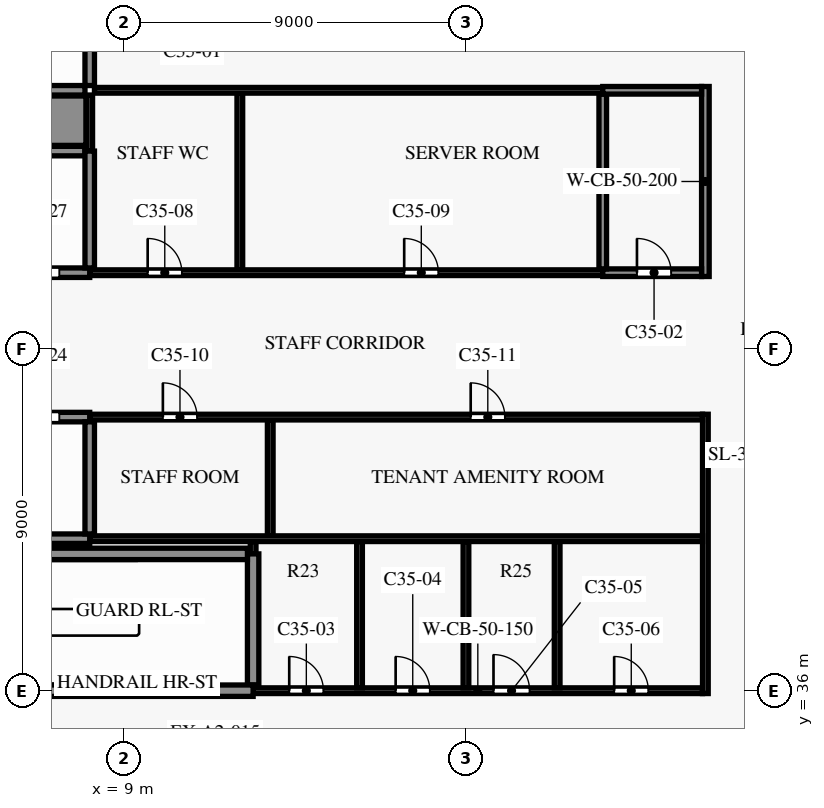
"""IFC4 building model, lengths in metres.
Left out: names, types, materials, properties, quantities, classifications, styles, units other than length and angle.
Written with IfcOpenShell. Run it as: python <this file> out.ifc"""

import sys

from ifc_helpers import new_model, si_unit, direction, frame, frame_2d, origin, place, context, subcontext, project, spatial, rectangle, extrude, element, fill, save


model = new_model("IFC4")
c1 = context("Model", 3, precision=1e-05, world=origin(), true_north=direction((0.0, 1.0)))
c2 = subcontext(c1, "Body", "Model", "MODEL_VIEW")
j1 = project(units=[si_unit("LENGTHUNIT", "METRE"), si_unit("PLANEANGLEUNIT", "RADIAN")], contexts=[c1])
p1 = place(None, origin())
s1 = spatial("IfcSite", under=j1, at=p1, CompositionType="ELEMENT")
p2 = place(p1, origin())
s2 = spatial("IfcBuilding", under=s1, at=p2, CompositionType="ELEMENT")
p3 = place(p2, frame((0.0, 0.0, 256.2)))
s3 = spatial("IfcBuildingStorey", under=s2, at=p3, CompositionType="ELEMENT", Elevation=256.2)
p4 = place(p3, frame((12.4, 36.0, 0.0), z_axis=(0.0, 0.0, 1.0), x_axis=(1.0, 0.0, 0.0)))
e1 = element("IfcWall", 1, at=p4, inside=s3, PredefinedType="SHEAR", context=c2, shape_type="SweptSolid", body=[
    extrude(rectangle(XDim=11.825, YDim=0.15, at=frame_2d((5.913, 0.0))), origin(), (0.0, 0.0, 1.0), 3.5),
])
p5 = place(p4, frame((0.95, 0.0, 0.0)))
e2 = element("IfcOpeningElement", 2, at=p5, cuts=e1, PredefinedType="OPENING", context=c2, shape_type="SweptSolid", body=[
    extrude(rectangle(XDim=0.9, YDim=2.1, at=frame_2d((0.45, 1.05))), frame((0.0, 0.085, 0.0), z_axis=(0.0, -1.0, 0.0), x_axis=(1.0, 0.0, 0.0)), (0.0, 0.0, 1.0), 0.17),
])
p6 = place(p4, frame((3.75, 0.0, 0.0)))
e3 = element("IfcOpeningElement", 3, at=p6, cuts=e1, PredefinedType="OPENING", context=c2, shape_type="SweptSolid", body=[
    extrude(rectangle(XDim=0.9, YDim=2.1, at=frame_2d((0.45, 1.05))), frame((0.0, 0.085, 0.0), z_axis=(0.0, -1.0, 0.0), x_axis=(1.0, 0.0, 0.0)), (0.0, 0.0, 1.0), 0.17),
])
p7 = place(p4, frame((6.325, 0.0, 0.0)))
e4 = element("IfcOpeningElement", 4, at=p7, cuts=e1, PredefinedType="OPENING", context=c2, shape_type="SweptSolid", body=[
    extrude(rectangle(XDim=0.95, YDim=2.1, at=frame_2d((0.475, 1.05))), frame((0.0, 0.085, 0.0), z_axis=(0.0, -1.0, 0.0), x_axis=(1.0, 0.0, 0.0)), (0.0, 0.0, 1.0), 0.17),
])
p8 = place(p4, frame((9.5, 0.0, 0.0)))
e5 = element("IfcOpeningElement", 5, at=p8, cuts=e1, PredefinedType="OPENING", context=c2, shape_type="SweptSolid", body=[
    extrude(rectangle(XDim=0.9, YDim=2.1, at=frame_2d((0.45, 1.05))), frame((0.0, 0.085, 0.0), z_axis=(0.0, -1.0, 0.0), x_axis=(1.0, 0.0, 0.0)), (0.0, 0.0, 1.0), 0.17),
])
p9 = place(p3, frame((4.4, 36.0, 0.0), z_axis=(0.0, 0.0, 1.0), x_axis=(1.0, 0.0, 0.0)))
e6 = element("IfcWall", 6, at=p9, inside=s3, PredefinedType="SHEAR", context=c2, shape_type="SweptSolid", body=[
    extrude(rectangle(XDim=8.0, YDim=0.3, at=frame_2d((4.0, 0.0))), origin(), (0.0, 0.0, 1.0), 3.5),
])
p10 = place(p9, frame((0.3, 0.0, 0.0)))
e7 = element("IfcOpeningElement", 7, at=p10, cuts=e6, PredefinedType="OPENING", context=c2, shape_type="SweptSolid", body=[
    extrude(rectangle(XDim=1.5, YDim=2.2, at=frame_2d((0.75, 1.1))), frame((0.0, 0.16, 0.0), z_axis=(0.0, -1.0, 0.0), x_axis=(1.0, 0.0, 0.0)), (0.0, 0.0, 1.0), 0.32),
])
p11 = place(p3, frame((4.55, 39.6, 0.0), z_axis=(0.0, 0.0, 1.0), x_axis=(1.0, 0.0, 0.0)))
e8 = element("IfcWall", 8, at=p11, inside=s3, PredefinedType="SHEAR", context=c2, shape_type="SweptSolid", body=[
    extrude(rectangle(XDim=7.7, YDim=0.3, at=frame_2d((3.85, 0.0))), origin(), (0.0, 0.0, 1.0), 3.5),
])
p12 = place(p3, frame((8.1, 40.0, 0.0), z_axis=(0.0, 0.0, 1.0), x_axis=(1.0, 0.0, 0.0)))
e9 = element("IfcWall", 9, at=p12, inside=s3, PredefinedType="PARTITIONING", context=c2, shape_type="SweptSolid", body=[
    extrude(rectangle(XDim=16.125, YDim=0.15, at=frame_2d((8.062, 0.0))), origin(), (0.0, 0.0, 1.0), 3.5),
])
p13 = place(p3, frame((0.15, 40.0, 0.0), z_axis=(0.0, 0.0, 1.0), x_axis=(1.0, 0.0, 0.0)))
e10 = element("IfcWall", 10, at=p13, inside=s3, PredefinedType="SHEAR", context=c2, shape_type="SweptSolid", body=[
    extrude(rectangle(XDim=7.95, YDim=0.25, at=frame_2d((3.975, 0.0))), origin(), (0.0, 0.0, 1.0), 3.5),
])
p14 = place(p3, frame((8.1, 43.2, 0.0), z_axis=(0.0, 0.0, 1.0), x_axis=(1.0, 0.0, 0.0)))
e11 = element("IfcWall", 11, at=p14, inside=s3, PredefinedType="PARTITIONING", context=c2, shape_type="SweptSolid", body=[
    extrude(rectangle(XDim=16.125, YDim=0.15, at=frame_2d((8.062, 0.0))), origin(), (0.0, 0.0, 1.0), 3.5),
])
p15 = place(p14, frame((1.925, 0.0, 0.0)))
e12 = element("IfcOpeningElement", 12, at=p15, cuts=e11, PredefinedType="OPENING", context=c2, shape_type="SweptSolid", body=[
    extrude(rectangle(XDim=0.9, YDim=2.1, at=frame_2d((0.45, 1.05))), frame((0.0, 0.085, 0.0), z_axis=(0.0, -1.0, 0.0), x_axis=(1.0, 0.0, 0.0)), (0.0, 0.0, 1.0), 0.17),
])
p16 = place(p14, frame((10.025, 0.0, 0.0)))
e13 = element("IfcOpeningElement", 13, at=p16, cuts=e11, PredefinedType="OPENING", context=c2, shape_type="SweptSolid", body=[
    extrude(rectangle(XDim=0.9, YDim=2.1, at=frame_2d((0.45, 1.05))), frame((0.0, 0.085, 0.0), z_axis=(0.0, -1.0, 0.0), x_axis=(1.0, 0.0, 0.0)), (0.0, 0.0, 1.0), 0.17),
])
p17 = place(p3, frame((0.125, 43.2, 0.0), z_axis=(0.0, 0.0, 1.0), x_axis=(1.0, 0.0, 0.0)))
e14 = element("IfcWall", 14, at=p17, inside=s3, PredefinedType="SHEAR", context=c2, shape_type="SweptSolid", body=[
    extrude(rectangle(XDim=7.975, YDim=0.25, at=frame_2d((3.988, 0.0))), origin(), (0.0, 0.0, 1.0), 3.5),
])
p18 = place(p17, frame((0.675, 0.0, 0.0)))
e15 = element("IfcOpeningElement", 15, at=p18, cuts=e14, PredefinedType="OPENING", context=c2, shape_type="SweptSolid", body=[
    extrude(rectangle(XDim=1.1, YDim=2.1, at=frame_2d((0.55, 1.05))), frame((0.0, 0.135, 0.0), z_axis=(0.0, -1.0, 0.0), x_axis=(1.0, 0.0, 0.0)), (0.0, 0.0, 1.0), 0.27),
])
p19 = place(p17, frame((3.375, 0.0, 0.0)))
e16 = element("IfcOpeningElement", 16, at=p19, cuts=e14, PredefinedType="OPENING", context=c2, shape_type="SweptSolid", body=[
    extrude(rectangle(XDim=1.1, YDim=2.1, at=frame_2d((0.55, 1.05))), frame((0.0, 0.135, 0.0), z_axis=(0.0, -1.0, 0.0), x_axis=(1.0, 0.0, 0.0)), (0.0, 0.0, 1.0), 0.27),
])
p20 = place(p17, frame((6.075, 0.0, 0.0)))
e17 = element("IfcOpeningElement", 17, at=p20, cuts=e14, PredefinedType="OPENING", context=c2, shape_type="SweptSolid", body=[
    extrude(rectangle(XDim=1.1, YDim=2.1, at=frame_2d((0.55, 1.05))), frame((0.0, 0.135, 0.0), z_axis=(0.0, -1.0, 0.0), x_axis=(1.0, 0.0, 0.0)), (0.0, 0.0, 1.0), 0.27),
])
p21 = place(p3, frame((8.1, 47.0, 0.0), z_axis=(0.0, 0.0, 1.0), x_axis=(1.0, 0.0, 0.0)))
e18 = element("IfcWall", 18, at=p21, inside=s3, PredefinedType="PARTITIONING", context=c2, shape_type="SweptSolid", body=[
    extrude(rectangle(XDim=13.5, YDim=0.15, at=frame_2d((6.75, 0.0))), origin(), (0.0, 0.0, 1.0), 3.5),
])
p22 = place(p21, frame((1.525, 0.0, 0.0)))
e19 = element("IfcOpeningElement", 19, at=p22, cuts=e18, PredefinedType="OPENING", context=c2, shape_type="SweptSolid", body=[
    extrude(rectangle(XDim=0.9, YDim=2.1, at=frame_2d((0.45, 1.05))), frame((0.0, 0.085, 0.0), z_axis=(0.0, -1.0, 0.0), x_axis=(1.0, 0.0, 0.0)), (0.0, 0.0, 1.0), 0.17),
])
p23 = place(p21, frame((8.275, 0.0, 0.0)))
e20 = element("IfcOpeningElement", 20, at=p23, cuts=e18, PredefinedType="OPENING", context=c2, shape_type="SweptSolid", body=[
    extrude(rectangle(XDim=0.9, YDim=2.1, at=frame_2d((0.45, 1.05))), frame((0.0, 0.085, 0.0), z_axis=(0.0, -1.0, 0.0), x_axis=(1.0, 0.0, 0.0)), (0.0, 0.0, 1.0), 0.17),
])
p24 = place(p3, frame((21.6, 47.0, 0.0), z_axis=(0.0, 0.0, 1.0), x_axis=(1.0, 0.0, 0.0)))
e21 = element("IfcWall", 21, at=p24, inside=s3, PredefinedType="PARTITIONING", context=c2, shape_type="SweptSolid", body=[
    extrude(rectangle(XDim=2.6, YDim=0.2, at=frame_2d((1.3, 0.0))), origin(), (0.0, 0.0, 1.0), 3.5),
])
p25 = place(p24, frame((0.9, 0.0, 0.0)))
e22 = element("IfcOpeningElement", 22, at=p25, cuts=e21, PredefinedType="OPENING", context=c2, shape_type="SweptSolid", body=[
    extrude(rectangle(XDim=0.9, YDim=2.1, at=frame_2d((0.45, 1.05))), frame((0.0, 0.11, 0.0), z_axis=(0.0, -1.0, 0.0), x_axis=(1.0, 0.0, 0.0)), (0.0, 0.0, 1.0), 0.22),
])
p26 = place(p3, frame((0.125, 47.0, 0.0), z_axis=(0.0, 0.0, 1.0), x_axis=(1.0, 0.0, 0.0)))
e23 = element("IfcWall", 23, at=p26, inside=s3, PredefinedType="SHEAR", context=c2, shape_type="SweptSolid", body=[
    extrude(rectangle(XDim=7.975, YDim=0.25, at=frame_2d((3.988, 0.0))), origin(), (0.0, 0.0, 1.0), 3.5),
])
p27 = place(p26, frame((0.675, 0.0, 0.0)))
e24 = element("IfcOpeningElement", 24, at=p27, cuts=e23, PredefinedType="OPENING", context=c2, shape_type="SweptSolid", body=[
    extrude(rectangle(XDim=1.1, YDim=2.1, at=frame_2d((0.55, 1.05))), frame((0.0, 0.135, 0.0), z_axis=(0.0, -1.0, 0.0), x_axis=(1.0, 0.0, 0.0)), (0.0, 0.0, 1.0), 0.27),
])
p28 = place(p26, frame((3.375, 0.0, 0.0)))
e25 = element("IfcOpeningElement", 25, at=p28, cuts=e23, PredefinedType="OPENING", context=c2, shape_type="SweptSolid", body=[
    extrude(rectangle(XDim=1.1, YDim=2.1, at=frame_2d((0.55, 1.05))), frame((0.0, 0.135, 0.0), z_axis=(0.0, -1.0, 0.0), x_axis=(1.0, 0.0, 0.0)), (0.0, 0.0, 1.0), 0.27),
])
p29 = place(p26, frame((6.075, 0.0, 0.0)))
e26 = element("IfcOpeningElement", 26, at=p29, cuts=e23, PredefinedType="OPENING", context=c2, shape_type="SweptSolid", body=[
    extrude(rectangle(XDim=1.1, YDim=2.1, at=frame_2d((0.55, 1.05))), frame((0.0, 0.135, 0.0), z_axis=(0.0, -1.0, 0.0), x_axis=(1.0, 0.0, 0.0)), (0.0, 0.0, 1.0), 0.27),
])
p30 = place(p3, frame((0.125, 50.2, 0.0), z_axis=(0.0, 0.0, 1.0), x_axis=(1.0, 0.0, 0.0)))
e27 = element("IfcWall", 27, at=p30, inside=s3, PredefinedType="SHEAR", context=c2, shape_type="SweptSolid", body=[
    extrude(rectangle(XDim=7.85, YDim=0.25, at=frame_2d((3.925, 0.0))), origin(), (0.0, 0.0, 1.0), 3.5),
])
p31 = place(p3, frame((-0.125, 51.0, 0.0), z_axis=(0.0, 0.0, 1.0), x_axis=(1.0, 0.0, 0.0)))
e28 = element("IfcWall", 28, at=p31, inside=s3, PredefinedType="SHEAR", context=c2, shape_type="SweptSolid", body=[
    extrude(rectangle(XDim=8.125, YDim=1.3, at=frame_2d((4.062, 0.0))), origin(), (0.0, 0.0, 1.0), 3.5),
])
p32 = place(p3, frame((8.225, 51.8, 0.0), z_axis=(0.0, 0.0, 1.0), x_axis=(1.0, 0.0, 0.0)))
e29 = element("IfcWall", 29, at=p32, inside=s3, PredefinedType="PARTITIONING", context=c2, shape_type="SweptSolid", body=[
    extrude(rectangle(XDim=13.375, YDim=0.15, at=frame_2d((6.688, 0.0))), origin(), (0.0, 0.0, 1.0), 3.5),
])
p33 = place(p3, frame((21.6, 51.8, 0.0), z_axis=(0.0, 0.0, 1.0), x_axis=(1.0, 0.0, 0.0)))
e30 = element("IfcWall", 30, at=p33, inside=s3, PredefinedType="PARTITIONING", context=c2, shape_type="SweptSolid", body=[
    extrude(rectangle(XDim=2.6, YDim=0.2, at=frame_2d((1.3, 0.0))), origin(), (0.0, 0.0, 1.0), 3.5),
])
p34 = place(p3, frame((0.125, 51.8, 0.0), z_axis=(0.0, 0.0, 1.0), x_axis=(1.0, 0.0, 0.0)))
e31 = element("IfcWall", 31, at=p34, inside=s3, PredefinedType="SHEAR", context=c2, shape_type="SweptSolid", body=[
    extrude(rectangle(XDim=7.85, YDim=0.25, at=frame_2d((3.925, 0.0))), origin(), (0.0, 0.0, 1.0), 3.5),
])
p35 = place(p3, frame((8.1, 50.2, 0.0), z_axis=(0.0, 0.0, 1.0), x_axis=(0.0, 1.0, 0.0)))
e32 = element("IfcWall", 32, at=p35, inside=s3, PredefinedType="PARTITIONING", context=c2, shape_type="SweptSolid", body=[
    extrude(rectangle(XDim=1.475, YDim=0.15, at=frame_2d((0.738, 0.0))), origin(), (0.0, 0.0, 1.0), 3.5),
])
p36 = place(p3, frame((8.1, 40.125, 0.0), z_axis=(0.0, 0.0, 1.0), x_axis=(0.0, 1.0, 0.0)))
e33 = element("IfcWall", 33, at=p36, inside=s3, PredefinedType="SHEAR", context=c2, shape_type="SweptSolid", body=[
    extrude(rectangle(XDim=2.95, YDim=0.25, at=frame_2d((1.475, 0.0))), origin(), (0.0, 0.0, 1.0), 3.5),
])
p37 = place(p3, frame((8.1, 47.125, 0.0), z_axis=(0.0, 0.0, 1.0), x_axis=(0.0, 1.0, 0.0)))
e34 = element("IfcWall", 34, at=p37, inside=s3, PredefinedType="SHEAR", context=c2, shape_type="SweptSolid", body=[
    extrude(rectangle(XDim=3.075, YDim=0.25, at=frame_2d((1.538, 0.0))), origin(), (0.0, 0.0, 1.0), 3.5),
])
p38 = place(p3, frame((8.1, 51.925, 0.0), z_axis=(0.0, 0.0, 1.0), x_axis=(0.0, 1.0, 0.0)))
e35 = element("IfcWall", 35, at=p38, inside=s3, PredefinedType="SHEAR", context=c2, shape_type="SweptSolid", body=[
    extrude(rectangle(XDim=2.95, YDim=0.25, at=frame_2d((1.475, 0.0))), origin(), (0.0, 0.0, 1.0), 3.5),
])
p39 = place(p3, frame((12.05, 47.075, 0.0), z_axis=(0.0, 0.0, 1.0), x_axis=(0.0, 1.0, 0.0)))
e36 = element("IfcWall", 36, at=p39, inside=s3, PredefinedType="PARTITIONING", context=c2, shape_type="SweptSolid", body=[
    extrude(rectangle(XDim=4.65, YDim=0.15, at=frame_2d((2.325, 0.0))), origin(), (0.0, 0.0, 1.0), 3.5),
])
p40 = place(p3, frame((12.4, 39.6, 0.0), z_axis=(0.0, 0.0, 1.0), x_axis=(0.0, 1.0, 0.0)))
e37 = element("IfcWall", 37, at=p40, inside=s3, PredefinedType="PARTITIONING", context=c2, shape_type="SweptSolid", body=[
    extrude(rectangle(XDim=0.325, YDim=0.15, at=frame_2d((0.163, 0.0))), origin(), (0.0, 0.0, 1.0), 3.5),
])
p41 = place(p3, frame((12.4, 36.15, 0.0), z_axis=(0.0, 0.0, 1.0), x_axis=(0.0, 1.0, 0.0)))
e38 = element("IfcWall", 38, at=p41, inside=s3, PredefinedType="SHEAR", context=c2, shape_type="SweptSolid", body=[
    extrude(rectangle(XDim=3.45, YDim=0.3, at=frame_2d((1.725, 0.0))), origin(), (0.0, 0.0, 1.0), 3.5),
])
p42 = place(p3, frame((12.85, 40.075, 0.0), z_axis=(0.0, 0.0, 1.0), x_axis=(0.0, 1.0, 0.0)))
e39 = element("IfcWall", 39, at=p42, inside=s3, PredefinedType="PARTITIONING", context=c2, shape_type="SweptSolid", body=[
    extrude(rectangle(XDim=3.05, YDim=0.15, at=frame_2d((1.525, 0.0))), origin(), (0.0, 0.0, 1.0), 3.5),
])
for number, where, z_axis, x_axis in (
    (40, (15.2, 36.075, 0.0), (0.0, 0.0, 1.0), (0.0, 1.0, 0.0)),
    (41, (18.0, 36.075, 0.0), (0.0, 0.0, 1.0), (0.0, 1.0, 0.0)),
    (42, (20.4, 36.075, 0.0), (0.0, 0.0, 1.0), (0.0, 1.0, 0.0)),
):
    element("IfcWall", number, at=place(p3, frame(where, z_axis=z_axis, x_axis=x_axis)), inside=s3, PredefinedType="PARTITIONING", context=c2, shape_type="SweptSolid", body=[
        extrude(rectangle(XDim=3.85, YDim=0.15, at=frame_2d((1.925, 0.0))), origin(), (0.0, 0.0, 1.0), 3.5),
    ])
p43 = place(p3, frame((21.6, 47.1, 0.0), z_axis=(0.0, 0.0, 1.0), x_axis=(0.0, 1.0, 0.0)))
e43 = element("IfcWall", 43, at=p43, inside=s3, PredefinedType="PARTITIONING", context=c2, shape_type="SweptSolid", body=[
    extrude(rectangle(XDim=4.6, YDim=0.2, at=frame_2d((2.3, 0.0))), origin(), (0.0, 0.0, 1.0), 3.5),
])
p44 = place(p3, frame((24.3, 35.925, 0.0), z_axis=(0.0, 0.0, 1.0), x_axis=(0.0, 1.0, 0.0)))
e44 = element("IfcWall", 44, at=p44, inside=s3, PredefinedType="PARTITIONING", context=c2, shape_type="SweptSolid", body=[
    extrude(rectangle(XDim=7.35, YDim=0.15, at=frame_2d((3.675, 0.0))), origin(), (0.0, 0.0, 1.0), 3.5),
])
p45 = place(p3, frame((24.3, 46.9, 0.0), z_axis=(0.0, 0.0, 1.0), x_axis=(0.0, 1.0, 0.0)))
e45 = element("IfcWall", 45, at=p45, inside=s3, PredefinedType="SHEAR", context=c2, shape_type="SweptSolid", body=[
    extrude(rectangle(XDim=5.0, YDim=0.2, at=frame_2d((2.5, 0.0))), origin(), (0.0, 0.0, 1.0), 3.5),
])
p46 = place(p25, origin())
e46 = element("IfcDoor", 46, at=p46, inside=s3, OperationType="SINGLE_SWING_LEFT", PredefinedType="DOOR", context=c2, shape_type="SweptSolid", body=[
    extrude(rectangle(XDim=0.9, YDim=2.1, at=frame_2d((0.45, 1.05))), frame((0.0, 0.025, 0.0), z_axis=(0.0, -1.0, 0.0), x_axis=(1.0, 0.0, 0.0)), (0.0, 0.0, 1.0), 0.05),
])
fill(e22, e46)
p47 = place(p5, origin())
e47 = element("IfcDoor", 47, at=p47, inside=s3, OperationType="SINGLE_SWING_RIGHT", PredefinedType="DOOR", context=c2, shape_type="SweptSolid", body=[
    extrude(rectangle(XDim=0.9, YDim=2.1, at=frame_2d((0.45, 1.05))), frame((0.0, 0.025, 0.0), z_axis=(0.0, -1.0, 0.0), x_axis=(1.0, 0.0, 0.0)), (0.0, 0.0, 1.0), 0.05),
])
fill(e2, e47)
p48 = place(p6, origin())
e48 = element("IfcDoor", 48, at=p48, inside=s3, OperationType="SINGLE_SWING_LEFT", PredefinedType="DOOR", context=c2, shape_type="SweptSolid", body=[
    extrude(rectangle(XDim=0.9, YDim=2.1, at=frame_2d((0.45, 1.05))), frame((0.0, 0.025, 0.0), z_axis=(0.0, -1.0, 0.0), x_axis=(1.0, 0.0, 0.0)), (0.0, 0.0, 1.0), 0.05),
])
fill(e3, e48)
p49 = place(p7, origin())
e49 = element("IfcDoor", 49, at=p49, inside=s3, OperationType="SINGLE_SWING_RIGHT", PredefinedType="DOOR", context=c2, shape_type="SweptSolid", body=[
    extrude(rectangle(XDim=0.95, YDim=2.1, at=frame_2d((0.475, 1.05))), frame((0.0, 0.025, 0.0), z_axis=(0.0, -1.0, 0.0), x_axis=(1.0, 0.0, 0.0)), (0.0, 0.0, 1.0), 0.05),
])
fill(e4, e49)
p50 = place(p8, origin())
e50 = element("IfcDoor", 50, at=p50, inside=s3, OperationType="SINGLE_SWING_LEFT", PredefinedType="DOOR", context=c2, shape_type="SweptSolid", body=[
    extrude(rectangle(XDim=0.9, YDim=2.1, at=frame_2d((0.45, 1.05))), frame((0.0, 0.025, 0.0), z_axis=(0.0, -1.0, 0.0), x_axis=(1.0, 0.0, 0.0)), (0.0, 0.0, 1.0), 0.05),
])
fill(e5, e50)
p51 = place(p22, origin())
e51 = element("IfcDoor", 51, at=p51, inside=s3, OperationType="SINGLE_SWING_LEFT", PredefinedType="DOOR", context=c2, shape_type="SweptSolid", body=[
    extrude(rectangle(XDim=0.9, YDim=2.1, at=frame_2d((0.45, 1.05))), frame((0.0, 0.025, 0.0), z_axis=(0.0, -1.0, 0.0), x_axis=(1.0, 0.0, 0.0)), (0.0, 0.0, 1.0), 0.05),
])
fill(e19, e51)
p52 = place(p23, origin())
e52 = element("IfcDoor", 52, at=p52, inside=s3, OperationType="SINGLE_SWING_RIGHT", PredefinedType="DOOR", context=c2, shape_type="SweptSolid", body=[
    extrude(rectangle(XDim=0.9, YDim=2.1, at=frame_2d((0.45, 1.05))), frame((0.0, 0.025, 0.0), z_axis=(0.0, -1.0, 0.0), x_axis=(1.0, 0.0, 0.0)), (0.0, 0.0, 1.0), 0.05),
])
fill(e20, e52)
p53 = place(p15, origin())
e53 = element("IfcDoor", 53, at=p53, inside=s3, OperationType="SINGLE_SWING_RIGHT", PredefinedType="DOOR", context=c2, shape_type="SweptSolid", body=[
    extrude(rectangle(XDim=0.9, YDim=2.1, at=frame_2d((0.45, 1.05))), frame((0.0, 0.025, 0.0), z_axis=(0.0, -1.0, 0.0), x_axis=(1.0, 0.0, 0.0)), (0.0, 0.0, 1.0), 0.05),
])
fill(e12, e53)
p54 = place(p16, origin())
e54 = element("IfcDoor", 54, at=p54, inside=s3, OperationType="SINGLE_SWING_LEFT", PredefinedType="DOOR", context=c2, shape_type="SweptSolid", body=[
    extrude(rectangle(XDim=0.9, YDim=2.1, at=frame_2d((0.45, 1.05))), frame((0.0, 0.025, 0.0), z_axis=(0.0, -1.0, 0.0), x_axis=(1.0, 0.0, 0.0)), (0.0, 0.0, 1.0), 0.05),
])
fill(e13, e54)
p55 = place(p20, origin())
e55 = element("IfcDoor", 55, at=p55, inside=s3, OperationType="DOUBLE_DOOR_SLIDING", PredefinedType="DOOR", context=c2, shape_type="SweptSolid", body=[
    extrude(rectangle(XDim=1.1, YDim=2.1, at=frame_2d((0.55, 1.05))), frame((0.0, 0.025, 0.0), z_axis=(0.0, -1.0, 0.0), x_axis=(1.0, 0.0, 0.0)), (0.0, 0.0, 1.0), 0.05),
])
fill(e17, e55)
p56 = place(p29, origin())
e56 = element("IfcDoor", 56, at=p56, inside=s3, OperationType="DOUBLE_DOOR_SLIDING", PredefinedType="DOOR", context=c2, shape_type="SweptSolid", body=[
    extrude(rectangle(XDim=1.1, YDim=2.1, at=frame_2d((0.55, 1.05))), frame((0.0, 0.025, 0.0), z_axis=(0.0, -1.0, 0.0), x_axis=(1.0, 0.0, 0.0)), (0.0, 0.0, 1.0), 0.05),
])
fill(e26, e56)
save(model, sys.argv[1])
